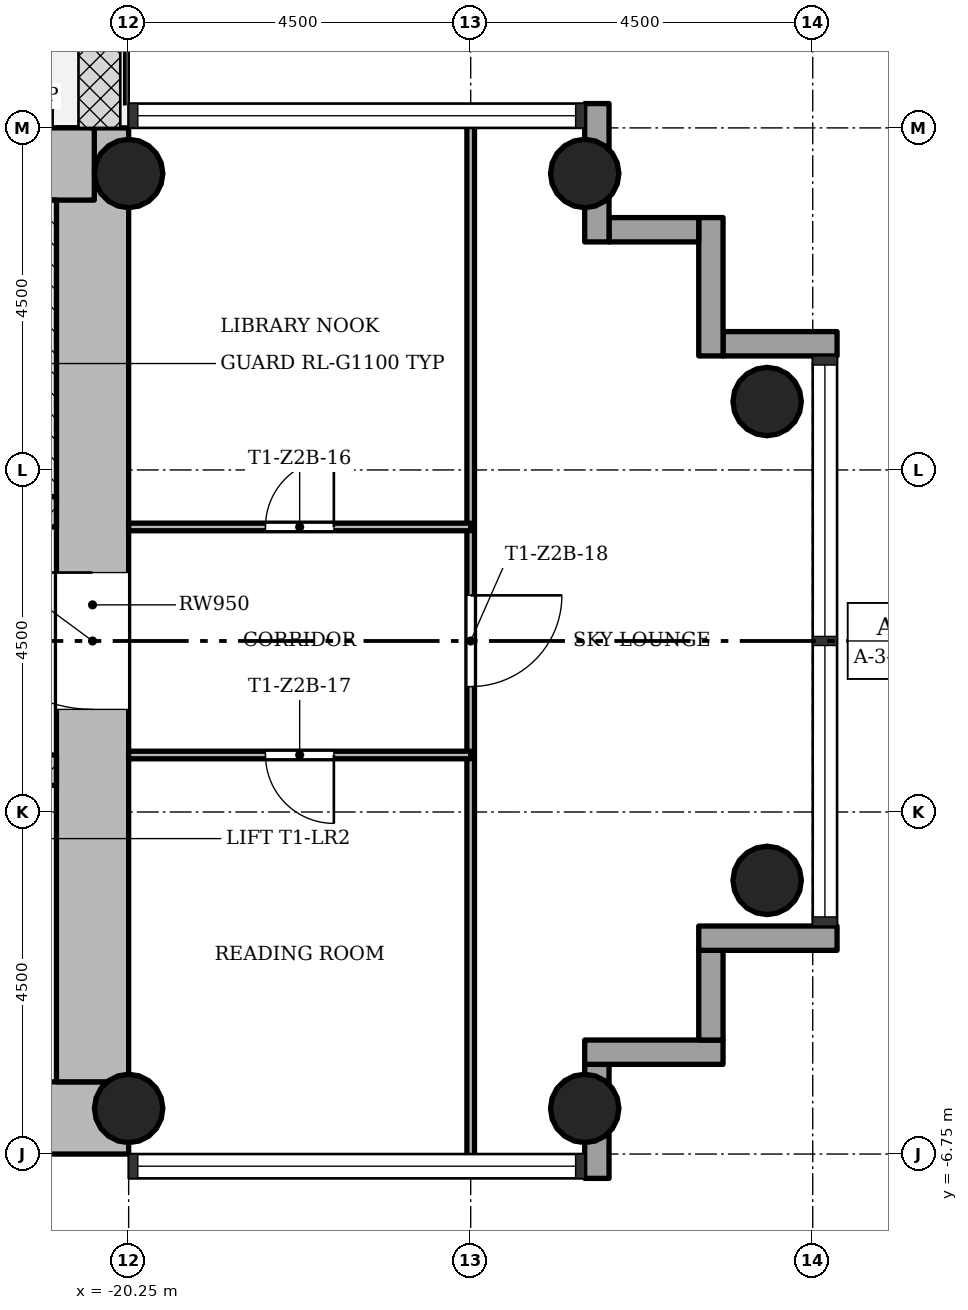
"""IFC4 building model, lengths in metres.
Left out: names, types, materials, properties, quantities, classifications, styles, units other than length and angle.
Written with IfcOpenShell. Run it as: python <this file> out.ifc"""

import sys

from ifc_helpers import new_model, si_unit, direction, frame, frame_2d, origin, origin_2d, place, context, subcontext, project, spatial, rectangle, hollow_circle, extrude, element, fill, save


model = new_model("IFC4")
c1 = context("Model", 3, precision=1e-05, world=origin(), true_north=direction((0.0, 1.0)))
c2 = subcontext(c1, "Body", "Model", "MODEL_VIEW")
j1 = project(units=[si_unit("LENGTHUNIT", "METRE"), si_unit("PLANEANGLEUNIT", "RADIAN")], contexts=[c1])
p1 = place(None, origin())
s1 = spatial("IfcSite", under=j1, at=p1, CompositionType="ELEMENT")
p2 = place(p1, origin())
s2 = spatial("IfcBuilding", under=s1, at=p2, CompositionType="ELEMENT")
p3 = place(p2, frame((0.0, 0.0, 83.4)))
s3 = spatial("IfcBuildingStorey", under=s2, at=p3, CompositionType="ELEMENT", Elevation=83.4)
p4 = place(p3, frame((-28.3, -6.275, 0.0), z_axis=(0.0, 0.0, 1.0), x_axis=(1.0, 0.0, 0.0)))
e1 = element("IfcWall", 1, at=p4, inside=s3, PredefinedType="SHEAR", context=c2, shape_type="SweptSolid", body=[
    extrude(rectangle(XDim=8.05, YDim=0.95, at=frame_2d((4.025, 0.0))), origin(), (0.0, 0.0, 1.0), 3.4),
])
p5 = place(p3, frame((-20.725, -5.8, 0.0), z_axis=(0.0, 0.0, 1.0), x_axis=(0.0, 1.0, 0.0)))
e2 = element("IfcWall", 2, at=p5, inside=s3, PredefinedType="SHEAR", context=c2, shape_type="SweptSolid", body=[
    extrude(rectangle(XDim=12.55, YDim=0.95, at=frame_2d((6.275, 0.0))), origin(), (0.0, 0.0, 1.0), 3.4),
])
p6 = place(p5, frame((4.9, 0.0, 0.0)))
e3 = element("IfcOpeningElement", 3, at=p6, cuts=e2, PredefinedType="OPENING", context=c2, shape_type="SweptSolid", body=[
    extrude(rectangle(XDim=1.8, YDim=2.1, at=frame_2d((0.9, 1.05))), frame((0.0, 0.485, 0.0), z_axis=(0.0, -1.0, 0.0), x_axis=(1.0, 0.0, 0.0)), (0.0, 0.0, 1.0), 0.97),
])
p7 = place(p3, frame((-20.702, 6.275, 0.0), z_axis=(0.0, 0.0, 1.0), x_axis=(-1.0, 0.0, 0.0)))
e4 = element("IfcWall", 4, at=p7, inside=s3, PredefinedType="SHEAR", context=c2, shape_type="SweptSolid", body=[
    extrude(rectangle(XDim=8.696, YDim=0.95, at=frame_2d((4.348, 0.0))), origin(), (0.0, 0.0, 1.0), 3.4),
])
p8 = place(p3, frame((-28.3, -1.7, 0.0), z_axis=(0.0, 0.0, 1.0), x_axis=(1.0, 0.0, 0.0)))
e5 = element("IfcWall", 5, at=p8, inside=s3, PredefinedType="SHEAR", context=c2, shape_type="SweptSolid", body=[
    extrude(rectangle(XDim=7.1, YDim=0.4, at=frame_2d((3.55, 0.0))), origin(), (0.0, 0.0, 1.0), 3.4),
])
p9 = place(p8, frame((0.8, 0.0, 0.0)))
e6 = element("IfcOpeningElement", 6, at=p9, cuts=e5, PredefinedType="OPENING", context=c2, shape_type="SweptSolid", body=[
    extrude(rectangle(XDim=1.1, YDim=2.1, at=frame_2d((0.55, 1.05))), frame((0.0, 0.21, 0.0), z_axis=(0.0, -1.0, 0.0), x_axis=(1.0, 0.0, 0.0)), (0.0, 0.0, 1.0), 0.42),
])
p10 = place(p8, frame((3.0, 0.0, 0.0)))
e7 = element("IfcOpeningElement", 7, at=p10, cuts=e5, PredefinedType="OPENING", context=c2, shape_type="SweptSolid", body=[
    extrude(rectangle(XDim=1.1, YDim=2.1, at=frame_2d((0.55, 1.05))), frame((0.0, 0.21, 0.0), z_axis=(0.0, -1.0, 0.0), x_axis=(1.0, 0.0, 0.0)), (0.0, 0.0, 1.0), 0.42),
])
p11 = place(p8, frame((5.2, 0.0, 0.0)))
e8 = element("IfcOpeningElement", 8, at=p11, cuts=e5, PredefinedType="OPENING", context=c2, shape_type="SweptSolid", body=[
    extrude(rectangle(XDim=1.1, YDim=2.1, at=frame_2d((0.55, 1.05))), frame((0.0, 0.21, 0.0), z_axis=(0.0, -1.0, 0.0), x_axis=(1.0, 0.0, 0.0)), (0.0, 0.0, 1.0), 0.42),
])
p12 = place(p3, frame((-28.3, 1.7, 0.0), z_axis=(0.0, 0.0, 1.0), x_axis=(1.0, 0.0, 0.0)))
e9 = element("IfcWall", 9, at=p12, inside=s3, PredefinedType="SHEAR", context=c2, shape_type="SweptSolid", body=[
    extrude(rectangle(XDim=7.1, YDim=0.4, at=frame_2d((3.55, 0.0))), origin(), (0.0, 0.0, 1.0), 3.4),
])
p13 = place(p12, frame((0.7, 0.0, 0.0)))
e10 = element("IfcOpeningElement", 10, at=p13, cuts=e9, PredefinedType="OPENING", context=c2, shape_type="SweptSolid", body=[
    extrude(rectangle(XDim=0.9, YDim=2.1, at=frame_2d((0.45, 1.05))), frame((0.0, 0.21, 0.0), z_axis=(0.0, -1.0, 0.0), x_axis=(1.0, 0.0, 0.0)), (0.0, 0.0, 1.0), 0.42),
])
for number, where, z_axis, x_axis in (
    (11, (-20.25, -6.15, 0.0), (0.0, 0.0, 1.0), (1.0, 0.0, 0.0)),
    (12, (-20.25, 6.15, 0.0), (0.0, 0.0, 1.0), (1.0, 0.0, 0.0)),
    (13, (-14.25, -6.15, 0.0), (0.0, 0.0, 1.0), (1.0, 0.0, 0.0)),
    (14, (-14.25, 6.15, 0.0), (0.0, 0.0, 1.0), (1.0, 0.0, 0.0)),
    (15, (-11.85, -3.15, 0.0), (0.0, 0.0, 1.0), (1.0, 0.0, 0.0)),
    (16, (-11.85, 3.15, 0.0), (0.0, 0.0, 1.0), (1.0, 0.0, 0.0)),
):
    element("IfcColumn", number, at=place(p3, frame(where, z_axis=z_axis, x_axis=x_axis)), inside=s3, PredefinedType="COLUMN", context=c2, shape_type="SweptSolid", body=[
        extrude(hollow_circle(Radius=0.45, WallThickness=0.032, at=origin_2d()), origin(), (0.0, 0.0, 1.0), 3.4),
    ])
p14 = place(p3, frame((-14.09, -7.07, -0.3), z_axis=(0.0, 0.0, 1.0), x_axis=(0.0, 1.0, 0.0)))
e17 = element("IfcWall", 17, at=p14, inside=s3, PredefinedType="STANDARD", context=c2, shape_type="SweptSolid", body=[
    extrude(rectangle(XDim=1.5, YDim=0.32, at=frame_2d((0.75, 0.0))), origin(), (0.0, 0.0, 1.0), 3.4),
])
p15 = place(p3, frame((-14.25, -5.41, -0.3), z_axis=(0.0, 0.0, 1.0), x_axis=(1.0, 0.0, 0.0)))
e18 = element("IfcWall", 18, at=p15, inside=s3, PredefinedType="STANDARD", context=c2, shape_type="SweptSolid", body=[
    extrude(rectangle(XDim=1.82, YDim=0.32, at=frame_2d((0.91, 0.0))), origin(), (0.0, 0.0, 1.0), 3.4),
])
p16 = place(p3, frame((-12.59, -5.25, -0.3), z_axis=(0.0, 0.0, 1.0), x_axis=(0.0, 1.0, 0.0)))
e19 = element("IfcWall", 19, at=p16, inside=s3, PredefinedType="STANDARD", context=c2, shape_type="SweptSolid", body=[
    extrude(rectangle(XDim=1.18, YDim=0.32, at=frame_2d((0.59, 0.0))), origin(), (0.0, 0.0, 1.0), 3.4),
])
p17 = place(p3, frame((-12.75, -3.91, -0.3), z_axis=(0.0, 0.0, 1.0), x_axis=(1.0, 0.0, 0.0)))
e20 = element("IfcWall", 20, at=p17, inside=s3, PredefinedType="STANDARD", context=c2, shape_type="SweptSolid", body=[
    extrude(rectangle(XDim=1.82, YDim=0.32, at=frame_2d((0.91, 0.0))), origin(), (0.0, 0.0, 1.0), 3.4),
])
p18 = place(p3, frame((-10.93, 3.91, -0.3), z_axis=(0.0, 0.0, 1.0), x_axis=(-1.0, 0.0, 0.0)))
e21 = element("IfcWall", 21, at=p18, inside=s3, PredefinedType="STANDARD", context=c2, shape_type="SweptSolid", body=[
    extrude(rectangle(XDim=1.5, YDim=0.32, at=frame_2d((0.75, 0.0))), origin(), (0.0, 0.0, 1.0), 3.4),
])
p19 = place(p3, frame((-12.59, 3.75, -0.3), z_axis=(0.0, 0.0, 1.0), x_axis=(0.0, 1.0, 0.0)))
e22 = element("IfcWall", 22, at=p19, inside=s3, PredefinedType="STANDARD", context=c2, shape_type="SweptSolid", body=[
    extrude(rectangle(XDim=1.82, YDim=0.32, at=frame_2d((0.91, 0.0))), origin(), (0.0, 0.0, 1.0), 3.4),
])
p20 = place(p3, frame((-12.75, 5.41, -0.3), z_axis=(0.0, 0.0, 1.0), x_axis=(-1.0, 0.0, 0.0)))
e23 = element("IfcWall", 23, at=p20, inside=s3, PredefinedType="STANDARD", context=c2, shape_type="SweptSolid", body=[
    extrude(rectangle(XDim=1.18, YDim=0.32, at=frame_2d((0.59, 0.0))), origin(), (0.0, 0.0, 1.0), 3.4),
])
p21 = place(p3, frame((-14.09, 5.25, -0.3), z_axis=(0.0, 0.0, 1.0), x_axis=(0.0, 1.0, 0.0)))
e24 = element("IfcWall", 24, at=p21, inside=s3, PredefinedType="STANDARD", context=c2, shape_type="SweptSolid", body=[
    extrude(rectangle(XDim=1.82, YDim=0.32, at=frame_2d((0.91, 0.0))), origin(), (0.0, 0.0, 1.0), 3.4),
])
p22 = place(p3, frame((-15.75, -6.85, 0.0), z_axis=(0.0, 0.0, 1.0), x_axis=(0.0, 1.0, 0.0)))
e25 = element("IfcWall", 25, at=p22, inside=s3, PredefinedType="PARTITIONING", context=c2, shape_type="SweptSolid", body=[
    extrude(rectangle(XDim=13.7, YDim=0.1, at=frame_2d((6.85, 0.0))), origin(), (0.0, 0.0, 1.0), 3.0),
])
p23 = place(p22, frame((6.25, 0.0, 0.0)))
e26 = element("IfcOpeningElement", 26, at=p23, cuts=e25, PredefinedType="OPENING", context=c2, shape_type="SweptSolid", body=[
    extrude(rectangle(XDim=1.2, YDim=2.1, at=frame_2d((0.6, 1.05))), frame((0.0, 0.06, 0.0), z_axis=(0.0, -1.0, 0.0), x_axis=(1.0, 0.0, 0.0)), (0.0, 0.0, 1.0), 0.12),
])
p24 = place(p3, frame((-20.25, -1.5, 0.0), z_axis=(0.0, 0.0, 1.0), x_axis=(1.0, 0.0, 0.0)))
e27 = element("IfcWall", 27, at=p24, inside=s3, PredefinedType="PARTITIONING", context=c2, shape_type="SweptSolid", body=[
    extrude(rectangle(XDim=4.5, YDim=0.1, at=frame_2d((2.25, 0.0))), origin(), (0.0, 0.0, 1.0), 3.0),
])
p25 = place(p24, frame((1.8, 0.0, 0.0)))
e28 = element("IfcOpeningElement", 28, at=p25, cuts=e27, PredefinedType="OPENING", context=c2, shape_type="SweptSolid", body=[
    extrude(rectangle(XDim=0.9, YDim=2.1, at=frame_2d((0.45, 1.05))), frame((0.0, 0.06, 0.0), z_axis=(0.0, -1.0, 0.0), x_axis=(1.0, 0.0, 0.0)), (0.0, 0.0, 1.0), 0.12),
])
p26 = place(p3, frame((-20.25, 1.5, 0.0), z_axis=(0.0, 0.0, 1.0), x_axis=(1.0, 0.0, 0.0)))
e29 = element("IfcWall", 29, at=p26, inside=s3, PredefinedType="PARTITIONING", context=c2, shape_type="SweptSolid", body=[
    extrude(rectangle(XDim=4.5, YDim=0.1, at=frame_2d((2.25, 0.0))), origin(), (0.0, 0.0, 1.0), 3.0),
])
p27 = place(p26, frame((1.8, 0.0, 0.0)))
e30 = element("IfcOpeningElement", 30, at=p27, cuts=e29, PredefinedType="OPENING", context=c2, shape_type="SweptSolid", body=[
    extrude(rectangle(XDim=0.9, YDim=2.1, at=frame_2d((0.45, 1.05))), frame((0.0, 0.06, 0.0), z_axis=(0.0, -1.0, 0.0), x_axis=(1.0, 0.0, 0.0)), (0.0, 0.0, 1.0), 0.12),
])
p28 = place(p3, frame((-21.325, 1.9, 0.0), z_axis=(0.0, 0.0, 1.0), x_axis=(0.0, 1.0, 0.0)))
e31 = element("IfcWall", 31, at=p28, inside=s3, PredefinedType="SHEAR", context=c2, shape_type="SweptSolid", body=[
    extrude(rectangle(XDim=3.9, YDim=0.25, at=frame_2d((1.95, 0.0))), origin(), (0.0, 0.0, 1.0), 3.4),
])
p29 = place(p27, origin())
e32 = element("IfcDoor", 32, at=p29, inside=s3, OperationType="SINGLE_SWING_LEFT", PredefinedType="DOOR", context=c2, shape_type="SweptSolid", body=[
    extrude(rectangle(XDim=0.9, YDim=2.1, at=frame_2d((0.45, 1.05))), frame((0.0, 0.025, 0.0), z_axis=(0.0, -1.0, 0.0), x_axis=(1.0, 0.0, 0.0)), (0.0, 0.0, 1.0), 0.05),
])
fill(e30, e32)
p30 = place(p25, origin())
e33 = element("IfcDoor", 33, at=p30, inside=s3, OperationType="SINGLE_SWING_RIGHT", PredefinedType="DOOR", context=c2, shape_type="SweptSolid", body=[
    extrude(rectangle(XDim=0.9, YDim=2.1, at=frame_2d((0.45, 1.05))), frame((0.0, 0.025, 0.0), z_axis=(0.0, -1.0, 0.0), x_axis=(1.0, 0.0, 0.0)), (0.0, 0.0, 1.0), 0.05),
])
fill(e28, e33)
p31 = place(p23, origin())
e34 = element("IfcDoor", 34, at=p31, inside=s3, OperationType="SINGLE_SWING_RIGHT", PredefinedType="DOOR", context=c2, shape_type="SweptSolid", body=[
    extrude(rectangle(XDim=1.2, YDim=2.1, at=frame_2d((0.6, 1.05))), frame((0.0, 0.025, 0.0), z_axis=(0.0, -1.0, 0.0), x_axis=(1.0, 0.0, 0.0)), (0.0, 0.0, 1.0), 0.05),
])
fill(e26, e34)
p32 = place(p6, origin())
e35 = element("IfcDoor", 35, at=p32, inside=s3, OperationType="SINGLE_SWING_LEFT", PredefinedType="DOOR", context=c2, shape_type="SweptSolid", body=[
    extrude(rectangle(XDim=1.8, YDim=2.1, at=frame_2d((0.9, 1.05))), frame((0.0, 0.025, 0.0), z_axis=(0.0, -1.0, 0.0), x_axis=(1.0, 0.0, 0.0)), (0.0, 0.0, 1.0), 0.05),
])
fill(e3, e35)
save(model, sys.argv[1])
